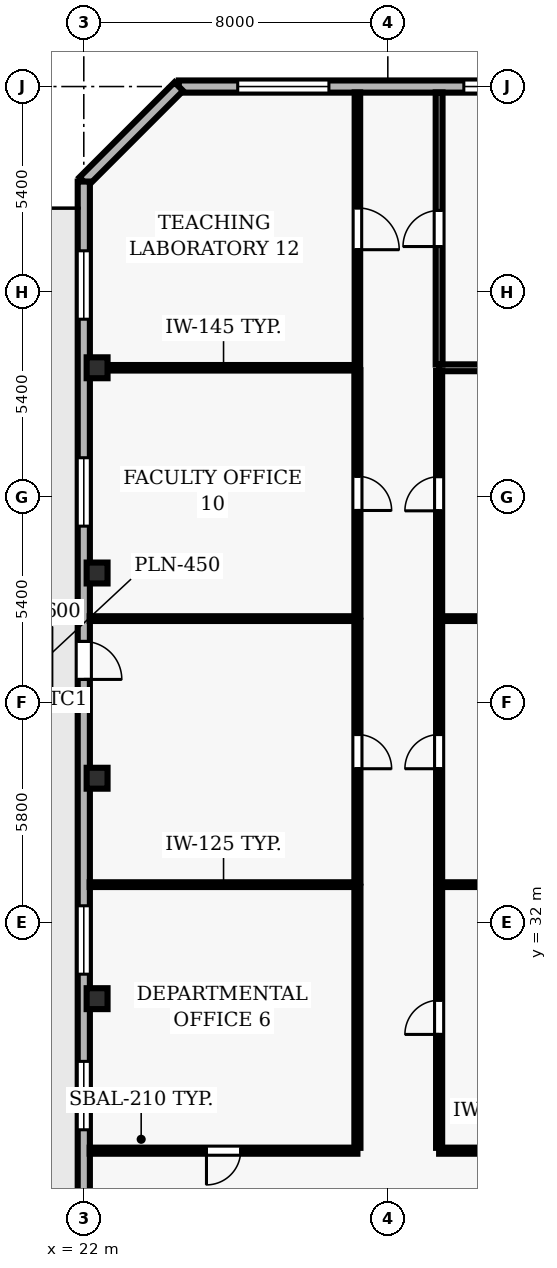
"""IFC4 building model, lengths in metres.
Left out: names, types, materials, properties, quantities, classifications, styles, units other than length and angle.
Written with IfcOpenShell. Run it as: python <this file> out.ifc"""

import sys

from ifc_helpers import new_model, si_unit, direction, frame, frame_2d, origin, origin_2d, place, context, subcontext, project, spatial, rectangle, hollow_rectangle, extrude, element, fill, save


model = new_model("IFC4")
c1 = context("Model", 3, precision=1e-05, world=origin(), true_north=direction((0.0, 1.0)))
c2 = subcontext(c1, "Body", "Model", "MODEL_VIEW")
j1 = project(units=[si_unit("LENGTHUNIT", "METRE"), si_unit("PLANEANGLEUNIT", "RADIAN")], contexts=[c1])
p1 = place(None, origin())
s1 = spatial("IfcSite", under=j1, at=p1, CompositionType="ELEMENT")
p2 = place(p1, origin())
s2 = spatial("IfcBuilding", under=s1, at=p2, CompositionType="ELEMENT")
p3 = place(p2, frame((0.0, 0.0, 42.7)))
s3 = spatial("IfcBuildingStorey", under=s2, at=p3, CompositionType="ELEMENT", Elevation=42.7)
for number, where, z_axis, x_axis in (
    (1, (22.35, 30.0, 0.0), (0.0, 0.0, 1.0), (1.0, 0.0, 0.0)),
    (2, (22.35, 35.8, 0.0), (0.0, 0.0, 1.0), (1.0, 0.0, 0.0)),
    (3, (22.35, 41.2, 0.0), (0.0, 0.0, 1.0), (1.0, 0.0, 0.0)),
    (4, (22.35, 46.6, 0.0), (0.0, 0.0, 1.0), (1.0, 0.0, 0.0)),
):
    element("IfcColumn", number, at=place(p3, frame(where, z_axis=z_axis, x_axis=x_axis)), inside=s3, PredefinedType="COLUMN", context=c2, shape_type="SweptSolid", body=[
        extrude(hollow_rectangle(XDim=0.55, YDim=0.55, WallThickness=0.025, at=origin_2d()), origin(), (0.0, 0.0, 1.0), 3.9),
    ])
p4 = place(p3, frame((35.5, 54.0, 0.0), z_axis=(0.0, 0.0, 1.0), x_axis=(-1.0, 0.0, 0.0)))
e5 = element("IfcWall", 5, at=p4, inside=s3, PredefinedType="SOLIDWALL", context=c2, shape_type="SweptSolid", body=[
    extrude(rectangle(XDim=11.0, YDim=0.32, at=frame_2d((5.5, 0.0))), origin(), (0.0, 0.0, 1.0), 3.69),
])
p5 = place(p4, frame((1.1, 0.0, 0.9)))
e6 = element("IfcOpeningElement", 6, at=p5, cuts=e5, PredefinedType="OPENING", context=c2, shape_type="SweptSolid", body=[
    extrude(rectangle(XDim=2.4, YDim=1.8, at=frame_2d((1.2, 0.9))), frame((0.0, 0.17, 0.0), z_axis=(0.0, -1.0, 0.0), x_axis=(1.0, 0.0, 0.0)), (0.0, 0.0, 1.0), 0.34),
])
p6 = place(p4, frame((7.05, 0.0, 0.9)))
e7 = element("IfcOpeningElement", 7, at=p6, cuts=e5, PredefinedType="OPENING", context=c2, shape_type="SweptSolid", body=[
    extrude(rectangle(XDim=2.4, YDim=1.8, at=frame_2d((1.2, 0.9))), frame((0.0, 0.17, 0.0), z_axis=(0.0, -1.0, 0.0), x_axis=(1.0, 0.0, 0.0)), (0.0, 0.0, 1.0), 0.34),
])
p7 = place(p3, frame((24.5, 54.0, 0.0), z_axis=(0.0, 0.0, 1.0), x_axis=(-0.707106781187, -0.707106781187, 0.0)))
e8 = element("IfcWall", 8, at=p7, inside=s3, PredefinedType="SOLIDWALL", context=c2, shape_type="SweptSolid", body=[
    extrude(rectangle(XDim=3.536, YDim=0.32, at=frame_2d((1.768, 0.0))), origin(), (0.0, 0.0, 1.0), 3.69),
])
p8 = place(p3, frame((22.0, 51.5, 0.0), z_axis=(0.0, 0.0, 1.0), x_axis=(0.0, -1.0, 0.0)))
e9 = element("IfcWall", 9, at=p8, inside=s3, PredefinedType="SOLIDWALL", context=c2, shape_type="SweptSolid", body=[
    extrude(rectangle(XDim=49.0, YDim=0.32, at=frame_2d((24.5, 0.0))), origin(), (0.0, 0.0, 1.0), 3.69),
])
p9 = place(p8, frame((12.1, 0.0, 0.0)))
e10 = element("IfcOpeningElement", 10, at=p9, cuts=e9, PredefinedType="OPENING", context=c2, shape_type="SweptSolid", body=[
    extrude(rectangle(XDim=1.0, YDim=2.2, at=frame_2d((0.5, 1.1))), frame((0.0, 0.17, 0.0), z_axis=(0.0, -1.0, 0.0), x_axis=(1.0, 0.0, 0.0)), (0.0, 0.0, 1.0), 0.34),
])
p10 = place(p8, frame((1.822, 0.0, 0.9)))
e11 = element("IfcOpeningElement", 11, at=p10, cuts=e9, PredefinedType="OPENING", context=c2, shape_type="SweptSolid", body=[
    extrude(rectangle(XDim=1.8, YDim=2.2, at=frame_2d((0.9, 1.1))), frame((0.0, 0.17, 0.0), z_axis=(0.0, -1.0, 0.0), x_axis=(1.0, 0.0, 0.0)), (0.0, 0.0, 1.0), 0.34),
])
p11 = place(p8, frame((7.267, 0.0, 0.9)))
e12 = element("IfcOpeningElement", 12, at=p11, cuts=e9, PredefinedType="OPENING", context=c2, shape_type="SweptSolid", body=[
    extrude(rectangle(XDim=1.8, YDim=2.2, at=frame_2d((0.9, 1.1))), frame((0.0, 0.17, 0.0), z_axis=(0.0, -1.0, 0.0), x_axis=(1.0, 0.0, 0.0)), (0.0, 0.0, 1.0), 0.34),
])
p12 = place(p8, frame((19.056, 0.0, 0.9)))
e13 = element("IfcOpeningElement", 13, at=p12, cuts=e9, PredefinedType="OPENING", context=c2, shape_type="SweptSolid", body=[
    extrude(rectangle(XDim=1.8, YDim=2.2, at=frame_2d((0.9, 1.1))), frame((0.0, 0.17, 0.0), z_axis=(0.0, -1.0, 0.0), x_axis=(1.0, 0.0, 0.0)), (0.0, 0.0, 1.0), 0.34),
])
p13 = place(p8, frame((23.15, 0.0, 0.9)))
e14 = element("IfcOpeningElement", 14, at=p13, cuts=e9, PredefinedType="OPENING", context=c2, shape_type="SweptSolid", body=[
    extrude(rectangle(XDim=1.8, YDim=2.2, at=frame_2d((0.9, 1.1))), frame((0.0, 0.17, 0.0), z_axis=(0.0, -1.0, 0.0), x_axis=(1.0, 0.0, 0.0)), (0.0, 0.0, 1.0), 0.34),
])
p14 = place(p8, frame((29.044, 0.0, 0.9)))
e15 = element("IfcOpeningElement", 15, at=p14, cuts=e9, PredefinedType="OPENING", context=c2, shape_type="SweptSolid", body=[
    extrude(rectangle(XDim=1.8, YDim=2.2, at=frame_2d((0.9, 1.1))), frame((0.0, 0.17, 0.0), z_axis=(0.0, -1.0, 0.0), x_axis=(1.0, 0.0, 0.0)), (0.0, 0.0, 1.0), 0.34),
])
p15 = place(p8, frame((34.039, 0.0, 0.9)))
e16 = element("IfcOpeningElement", 16, at=p15, cuts=e9, PredefinedType="OPENING", context=c2, shape_type="SweptSolid", body=[
    extrude(rectangle(XDim=1.8, YDim=2.2, at=frame_2d((0.9, 1.1))), frame((0.0, 0.17, 0.0), z_axis=(0.0, -1.0, 0.0), x_axis=(1.0, 0.0, 0.0)), (0.0, 0.0, 1.0), 0.34),
])
p16 = place(p8, frame((39.933, 0.0, 0.9)))
e17 = element("IfcOpeningElement", 17, at=p16, cuts=e9, PredefinedType="OPENING", context=c2, shape_type="SweptSolid", body=[
    extrude(rectangle(XDim=1.8, YDim=2.2, at=frame_2d((0.9, 1.1))), frame((0.0, 0.17, 0.0), z_axis=(0.0, -1.0, 0.0), x_axis=(1.0, 0.0, 0.0)), (0.0, 0.0, 1.0), 0.34),
])
p17 = place(p3, frame((29.2, 26.0, 0.0), z_axis=(0.0, 0.0, 1.0), x_axis=(-1.0, 0.0, 0.0)))
e18 = element("IfcWall", 18, at=p17, inside=s3, PredefinedType="PARTITIONING", context=c2, shape_type="SweptSolid", body=[
    extrude(rectangle(XDim=7.045, YDim=0.16, at=frame_2d((3.522, 0.0))), origin(), (0.0, 0.0, 1.0), 3.69),
])
p18 = place(p17, frame((3.072, 0.0, 0.0)))
e19 = element("IfcOpeningElement", 19, at=p18, cuts=e18, PredefinedType="OPENING", context=c2, shape_type="SweptSolid", body=[
    extrude(rectangle(XDim=0.9, YDim=2.1, at=frame_2d((0.45, 1.05))), frame((0.0, 0.09, 0.0), z_axis=(0.0, -1.0, 0.0), x_axis=(1.0, 0.0, 0.0)), (0.0, 0.0, 1.0), 0.18),
])
p19 = place(p3, frame((29.2, 33.0, 0.0), z_axis=(0.0, 0.0, 1.0), x_axis=(-1.0, 0.0, 0.0)))
e20 = element("IfcWall", 20, at=p19, inside=s3, PredefinedType="PARTITIONING", context=c2, shape_type="SweptSolid", body=[
    extrude(rectangle(XDim=7.045, YDim=0.125, at=frame_2d((3.522, 0.0))), origin(), (0.0, 0.0, 1.0), 3.277),
])
p20 = place(p3, frame((29.2, 40.0, 0.0), z_axis=(0.0, 0.0, 1.0), x_axis=(-1.0, 0.0, 0.0)))
e21 = element("IfcWall", 21, at=p20, inside=s3, PredefinedType="PARTITIONING", context=c2, shape_type="SweptSolid", body=[
    extrude(rectangle(XDim=7.045, YDim=0.125, at=frame_2d((3.522, 0.0))), origin(), (0.0, 0.0, 1.0), 3.69),
])
p21 = place(p3, frame((29.2, 46.6, 0.0), z_axis=(0.0, 0.0, 1.0), x_axis=(-1.0, 0.0, 0.0)))
e22 = element("IfcWall", 22, at=p21, inside=s3, PredefinedType="PARTITIONING", context=c2, shape_type="SweptSolid", body=[
    extrude(rectangle(XDim=7.045, YDim=0.145, at=frame_2d((3.522, 0.0))), origin(), (0.0, 0.0, 1.0), 3.055),
])
p22 = place(p3, frame((35.15, 26.0, 0.0), z_axis=(0.0, 0.0, 1.0), x_axis=(-1.0, 0.0, 0.0)))
e23 = element("IfcWall", 23, at=p22, inside=s3, PredefinedType="PARTITIONING", context=c2, shape_type="SweptSolid", body=[
    extrude(rectangle(XDim=3.8, YDim=0.16, at=frame_2d((1.9, 0.0))), origin(), (0.0, 0.0, 1.0), 3.69),
])
p23 = place(p3, frame((37.845, 33.0, 0.0), z_axis=(0.0, 0.0, 1.0), x_axis=(-1.0, 0.0, 0.0)))
e24 = element("IfcWall", 24, at=p23, inside=s3, PredefinedType="PARTITIONING", context=c2, shape_type="SweptSolid", body=[
    extrude(rectangle(XDim=6.495, YDim=0.125, at=frame_2d((3.248, 0.0))), origin(), (0.0, 0.0, 1.0), 3.277),
])
p24 = place(p3, frame((37.845, 40.0, 0.0), z_axis=(0.0, 0.0, 1.0), x_axis=(-1.0, 0.0, 0.0)))
e25 = element("IfcWall", 25, at=p24, inside=s3, PredefinedType="PARTITIONING", context=c2, shape_type="SweptSolid", body=[
    extrude(rectangle(XDim=6.495, YDim=0.125, at=frame_2d((3.248, 0.0))), origin(), (0.0, 0.0, 1.0), 3.69),
])
p25 = place(p3, frame((37.845, 46.6, 0.0), z_axis=(0.0, 0.0, 1.0), x_axis=(-1.0, 0.0, 0.0)))
e26 = element("IfcWall", 26, at=p25, inside=s3, PredefinedType="PARTITIONING", context=c2, shape_type="SweptSolid", body=[
    extrude(rectangle(XDim=6.495, YDim=0.18, at=frame_2d((3.248, 0.0))), origin(), (0.0, 0.0, 1.0), 3.055),
])
p26 = place(p3, frame((29.2, 32.943, 0.0), z_axis=(0.0, 0.0, 1.0), x_axis=(0.0, -1.0, 0.0)))
e27 = element("IfcWall", 27, at=p26, inside=s3, PredefinedType="PARTITIONING", context=c2, shape_type="SweptSolid", body=[
    extrude(rectangle(XDim=6.868, YDim=0.16, at=frame_2d((3.434, 0.0))), origin(), (0.0, 0.0, 1.0), 3.69),
])
p27 = place(p3, frame((29.2, 39.943, 0.0), z_axis=(0.0, 0.0, 1.0), x_axis=(0.0, -1.0, 0.0)))
e28 = element("IfcWall", 28, at=p27, inside=s3, PredefinedType="PARTITIONING", context=c2, shape_type="SweptSolid", body=[
    extrude(rectangle(XDim=6.886, YDim=0.16, at=frame_2d((3.443, 0.0))), origin(), (0.0, 0.0, 1.0), 3.69),
])
p28 = place(p27, frame((2.993, 0.0, 0.0)))
e29 = element("IfcOpeningElement", 29, at=p28, cuts=e28, PredefinedType="OPENING", context=c2, shape_type="SweptSolid", body=[
    extrude(rectangle(XDim=0.9, YDim=2.1, at=frame_2d((0.45, 1.05))), frame((0.0, 0.09, 0.0), z_axis=(0.0, -1.0, 0.0), x_axis=(1.0, 0.0, 0.0)), (0.0, 0.0, 1.0), 0.18),
])
p29 = place(p3, frame((29.2, 46.532, 0.0), z_axis=(0.0, 0.0, 1.0), x_axis=(0.0, -1.0, 0.0)))
e30 = element("IfcWall", 30, at=p29, inside=s3, PredefinedType="PARTITIONING", context=c2, shape_type="SweptSolid", body=[
    extrude(rectangle(XDim=6.475, YDim=0.16, at=frame_2d((3.238, 0.0))), origin(), (0.0, 0.0, 1.0), 3.69),
])
p30 = place(p29, frame((2.787, 0.0, 0.0)))
e31 = element("IfcOpeningElement", 31, at=p30, cuts=e30, PredefinedType="OPENING", context=c2, shape_type="SweptSolid", body=[
    extrude(rectangle(XDim=0.9, YDim=2.1, at=frame_2d((0.45, 1.05))), frame((0.0, 0.09, 0.0), z_axis=(0.0, -1.0, 0.0), x_axis=(1.0, 0.0, 0.0)), (0.0, 0.0, 1.0), 0.18),
])
p31 = place(p3, frame((29.2, 53.845, 0.0), z_axis=(0.0, 0.0, 1.0), x_axis=(0.0, -1.0, 0.0)))
e32 = element("IfcWall", 32, at=p31, inside=s3, PredefinedType="PARTITIONING", context=c2, shape_type="SweptSolid", body=[
    extrude(rectangle(XDim=7.177, YDim=0.145, at=frame_2d((3.588, 0.0))), origin(), (0.0, 0.0, 1.0), 3.69),
])
p32 = place(p31, frame((3.038, 0.0, 0.0)))
e33 = element("IfcOpeningElement", 33, at=p32, cuts=e32, PredefinedType="OPENING", context=c2, shape_type="SweptSolid", body=[
    extrude(rectangle(XDim=1.1, YDim=2.15, at=frame_2d((0.55, 1.075))), frame((0.0, 0.083, 0.0), z_axis=(0.0, -1.0, 0.0), x_axis=(1.0, 0.0, 0.0)), (0.0, 0.0, 1.0), 0.165),
])
p33 = place(p3, frame((31.35, 26.075, 0.0), z_axis=(0.0, 0.0, 1.0), x_axis=(0.0, 1.0, 0.0)))
e34 = element("IfcWall", 34, at=p33, inside=s3, PredefinedType="PARTITIONING", context=c2, shape_type="SweptSolid", body=[
    extrude(rectangle(XDim=6.868, YDim=0.16, at=frame_2d((3.434, 0.0))), origin(), (0.0, 0.0, 1.0), 3.69),
])
p34 = place(p33, frame((2.984, 0.0, 0.0)))
e35 = element("IfcOpeningElement", 35, at=p34, cuts=e34, PredefinedType="OPENING", context=c2, shape_type="SweptSolid", body=[
    extrude(rectangle(XDim=0.9, YDim=2.1, at=frame_2d((0.45, 1.05))), frame((0.0, 0.09, 0.0), z_axis=(0.0, -1.0, 0.0), x_axis=(1.0, 0.0, 0.0)), (0.0, 0.0, 1.0), 0.18),
])
p35 = place(p3, frame((31.35, 33.057, 0.0), z_axis=(0.0, 0.0, 1.0), x_axis=(0.0, 1.0, 0.0)))
e36 = element("IfcWall", 36, at=p35, inside=s3, PredefinedType="PARTITIONING", context=c2, shape_type="SweptSolid", body=[
    extrude(rectangle(XDim=6.886, YDim=0.16, at=frame_2d((3.443, 0.0))), origin(), (0.0, 0.0, 1.0), 3.69),
])
p36 = place(p35, frame((2.993, 0.0, 0.0)))
e37 = element("IfcOpeningElement", 37, at=p36, cuts=e36, PredefinedType="OPENING", context=c2, shape_type="SweptSolid", body=[
    extrude(rectangle(XDim=0.9, YDim=2.1, at=frame_2d((0.45, 1.05))), frame((0.0, 0.09, 0.0), z_axis=(0.0, -1.0, 0.0), x_axis=(1.0, 0.0, 0.0)), (0.0, 0.0, 1.0), 0.18),
])
p37 = place(p3, frame((31.35, 40.057, 0.0), z_axis=(0.0, 0.0, 1.0), x_axis=(0.0, 1.0, 0.0)))
e38 = element("IfcWall", 38, at=p37, inside=s3, PredefinedType="PARTITIONING", context=c2, shape_type="SweptSolid", body=[
    extrude(rectangle(XDim=6.458, YDim=0.16, at=frame_2d((3.229, 0.0))), origin(), (0.0, 0.0, 1.0), 3.69),
])
p38 = place(p37, frame((2.779, 0.0, 0.0)))
e39 = element("IfcOpeningElement", 39, at=p38, cuts=e38, PredefinedType="OPENING", context=c2, shape_type="SweptSolid", body=[
    extrude(rectangle(XDim=0.9, YDim=2.1, at=frame_2d((0.45, 1.05))), frame((0.0, 0.09, 0.0), z_axis=(0.0, -1.0, 0.0), x_axis=(1.0, 0.0, 0.0)), (0.0, 0.0, 1.0), 0.18),
])
p39 = place(p3, frame((31.35, 46.685, 0.0), z_axis=(0.0, 0.0, 1.0), x_axis=(0.0, 1.0, 0.0)))
e40 = element("IfcWall", 40, at=p39, inside=s3, PredefinedType="PARTITIONING", context=c2, shape_type="SweptSolid", body=[
    extrude(rectangle(XDim=7.16, YDim=0.18, at=frame_2d((3.58, 0.0))), origin(), (0.0, 0.0, 1.0), 3.69),
])
p40 = place(p39, frame((3.105, 0.0, 0.0)))
e41 = element("IfcOpeningElement", 41, at=p40, cuts=e40, PredefinedType="OPENING", context=c2, shape_type="SweptSolid", body=[
    extrude(rectangle(XDim=0.95, YDim=2.1, at=frame_2d((0.475, 1.05))), frame((0.0, 0.1, 0.0), z_axis=(0.0, -1.0, 0.0), x_axis=(1.0, 0.0, 0.0)), (0.0, 0.0, 1.0), 0.2),
])
p41 = place(p5, origin())
e42 = element("IfcWindow", 42, at=p41, inside=s3, PartitioningType="SINGLE_PANEL", PredefinedType="WINDOW", context=c2, shape_type="SweptSolid", body=[
    extrude(rectangle(XDim=2.4, YDim=1.8, at=frame_2d((1.2, 0.9))), frame((0.0, 0.03, 0.0), z_axis=(0.0, -1.0, 0.0), x_axis=(1.0, 0.0, 0.0)), (0.0, 0.0, 1.0), 0.06),
])
fill(e6, e42)
p42 = place(p6, origin())
e43 = element("IfcWindow", 43, at=p42, inside=s3, PartitioningType="SINGLE_PANEL", PredefinedType="WINDOW", context=c2, shape_type="SweptSolid", body=[
    extrude(rectangle(XDim=2.4, YDim=1.8, at=frame_2d((1.2, 0.9))), frame((0.0, 0.03, 0.0), z_axis=(0.0, -1.0, 0.0), x_axis=(1.0, 0.0, 0.0)), (0.0, 0.0, 1.0), 0.06),
])
fill(e7, e43)
p43 = place(p9, origin())
e44 = element("IfcDoor", 44, at=p43, inside=s3, OperationType="SINGLE_SWING_RIGHT", PredefinedType="DOOR", context=c2, shape_type="SweptSolid", body=[
    extrude(rectangle(XDim=1.0, YDim=2.2, at=frame_2d((0.5, 1.1))), frame((0.0, 0.025, 0.0), z_axis=(0.0, -1.0, 0.0), x_axis=(1.0, 0.0, 0.0)), (0.0, 0.0, 1.0), 0.05),
])
fill(e10, e44)
p44 = place(p10, origin())
e45 = element("IfcWindow", 45, at=p44, inside=s3, PartitioningType="SINGLE_PANEL", PredefinedType="WINDOW", context=c2, shape_type="SweptSolid", body=[
    extrude(rectangle(XDim=1.8, YDim=2.2, at=frame_2d((0.9, 1.1))), frame((0.0, 0.03, 0.0), z_axis=(0.0, -1.0, 0.0), x_axis=(1.0, 0.0, 0.0)), (0.0, 0.0, 1.0), 0.06),
])
fill(e11, e45)
p45 = place(p11, origin())
e46 = element("IfcWindow", 46, at=p45, inside=s3, PartitioningType="SINGLE_PANEL", PredefinedType="WINDOW", context=c2, shape_type="SweptSolid", body=[
    extrude(rectangle(XDim=1.8, YDim=2.2, at=frame_2d((0.9, 1.1))), frame((0.0, 0.03, 0.0), z_axis=(0.0, -1.0, 0.0), x_axis=(1.0, 0.0, 0.0)), (0.0, 0.0, 1.0), 0.06),
])
fill(e12, e46)
p46 = place(p12, origin())
e47 = element("IfcWindow", 47, at=p46, inside=s3, PartitioningType="SINGLE_PANEL", PredefinedType="WINDOW", context=c2, shape_type="SweptSolid", body=[
    extrude(rectangle(XDim=1.8, YDim=2.2, at=frame_2d((0.9, 1.1))), frame((0.0, 0.03, 0.0), z_axis=(0.0, -1.0, 0.0), x_axis=(1.0, 0.0, 0.0)), (0.0, 0.0, 1.0), 0.06),
])
fill(e13, e47)
p47 = place(p13, origin())
e48 = element("IfcWindow", 48, at=p47, inside=s3, PartitioningType="SINGLE_PANEL", PredefinedType="WINDOW", context=c2, shape_type="SweptSolid", body=[
    extrude(rectangle(XDim=1.8, YDim=2.2, at=frame_2d((0.9, 1.1))), frame((0.0, 0.03, 0.0), z_axis=(0.0, -1.0, 0.0), x_axis=(1.0, 0.0, 0.0)), (0.0, 0.0, 1.0), 0.06),
])
fill(e14, e48)
p48 = place(p18, origin())
e49 = element("IfcDoor", 49, at=p48, inside=s3, OperationType="SINGLE_SWING_RIGHT", PredefinedType="DOOR", context=c2, shape_type="SweptSolid", body=[
    extrude(rectangle(XDim=0.9, YDim=2.1, at=frame_2d((0.45, 1.05))), frame((0.0, 0.025, 0.0), z_axis=(0.0, -1.0, 0.0), x_axis=(1.0, 0.0, 0.0)), (0.0, 0.0, 1.0), 0.05),
])
fill(e19, e49)
p49 = place(p34, origin())
e50 = element("IfcDoor", 50, at=p49, inside=s3, OperationType="SINGLE_SWING_LEFT", PredefinedType="DOOR", context=c2, shape_type="SweptSolid", body=[
    extrude(rectangle(XDim=0.9, YDim=2.1, at=frame_2d((0.45, 1.05))), frame((0.0, 0.025, 0.0), z_axis=(0.0, -1.0, 0.0), x_axis=(1.0, 0.0, 0.0)), (0.0, 0.0, 1.0), 0.05),
])
fill(e35, e50)
p50 = place(p28, origin())
e51 = element("IfcDoor", 51, at=p50, inside=s3, OperationType="SINGLE_SWING_RIGHT", PredefinedType="DOOR", context=c2, shape_type="SweptSolid", body=[
    extrude(rectangle(XDim=0.9, YDim=2.1, at=frame_2d((0.45, 1.05))), frame((0.0, 0.025, 0.0), z_axis=(0.0, -1.0, 0.0), x_axis=(1.0, 0.0, 0.0)), (0.0, 0.0, 1.0), 0.05),
])
fill(e29, e51)
p51 = place(p36, origin())
e52 = element("IfcDoor", 52, at=p51, inside=s3, OperationType="SINGLE_SWING_LEFT", PredefinedType="DOOR", context=c2, shape_type="SweptSolid", body=[
    extrude(rectangle(XDim=0.9, YDim=2.1, at=frame_2d((0.45, 1.05))), frame((0.0, 0.025, 0.0), z_axis=(0.0, -1.0, 0.0), x_axis=(1.0, 0.0, 0.0)), (0.0, 0.0, 1.0), 0.05),
])
fill(e37, e52)
p52 = place(p30, origin())
e53 = element("IfcDoor", 53, at=p52, inside=s3, OperationType="SINGLE_SWING_RIGHT", PredefinedType="DOOR", context=c2, shape_type="SweptSolid", body=[
    extrude(rectangle(XDim=0.9, YDim=2.1, at=frame_2d((0.45, 1.05))), frame((0.0, 0.025, 0.0), z_axis=(0.0, -1.0, 0.0), x_axis=(1.0, 0.0, 0.0)), (0.0, 0.0, 1.0), 0.05),
])
fill(e31, e53)
p53 = place(p38, origin())
e54 = element("IfcDoor", 54, at=p53, inside=s3, OperationType="SINGLE_SWING_LEFT", PredefinedType="DOOR", context=c2, shape_type="SweptSolid", body=[
    extrude(rectangle(XDim=0.9, YDim=2.1, at=frame_2d((0.45, 1.05))), frame((0.0, 0.025, 0.0), z_axis=(0.0, -1.0, 0.0), x_axis=(1.0, 0.0, 0.0)), (0.0, 0.0, 1.0), 0.05),
])
fill(e39, e54)
p54 = place(p32, origin())
e55 = element("IfcDoor", 55, at=p54, inside=s3, OperationType="SINGLE_SWING_RIGHT", PredefinedType="DOOR", context=c2, shape_type="SweptSolid", body=[
    extrude(rectangle(XDim=1.1, YDim=2.15, at=frame_2d((0.55, 1.075))), frame((0.0, 0.025, 0.0), z_axis=(0.0, -1.0, 0.0), x_axis=(1.0, 0.0, 0.0)), (0.0, 0.0, 1.0), 0.05),
])
fill(e33, e55)
p55 = place(p40, origin())
e56 = element("IfcDoor", 56, at=p55, inside=s3, OperationType="SINGLE_SWING_LEFT", PredefinedType="DOOR", context=c2, shape_type="SweptSolid", body=[
    extrude(rectangle(XDim=0.95, YDim=2.1, at=frame_2d((0.475, 1.05))), frame((0.0, 0.025, 0.0), z_axis=(0.0, -1.0, 0.0), x_axis=(1.0, 0.0, 0.0)), (0.0, 0.0, 1.0), 0.05),
])
fill(e41, e56)
save(model, sys.argv[1])
